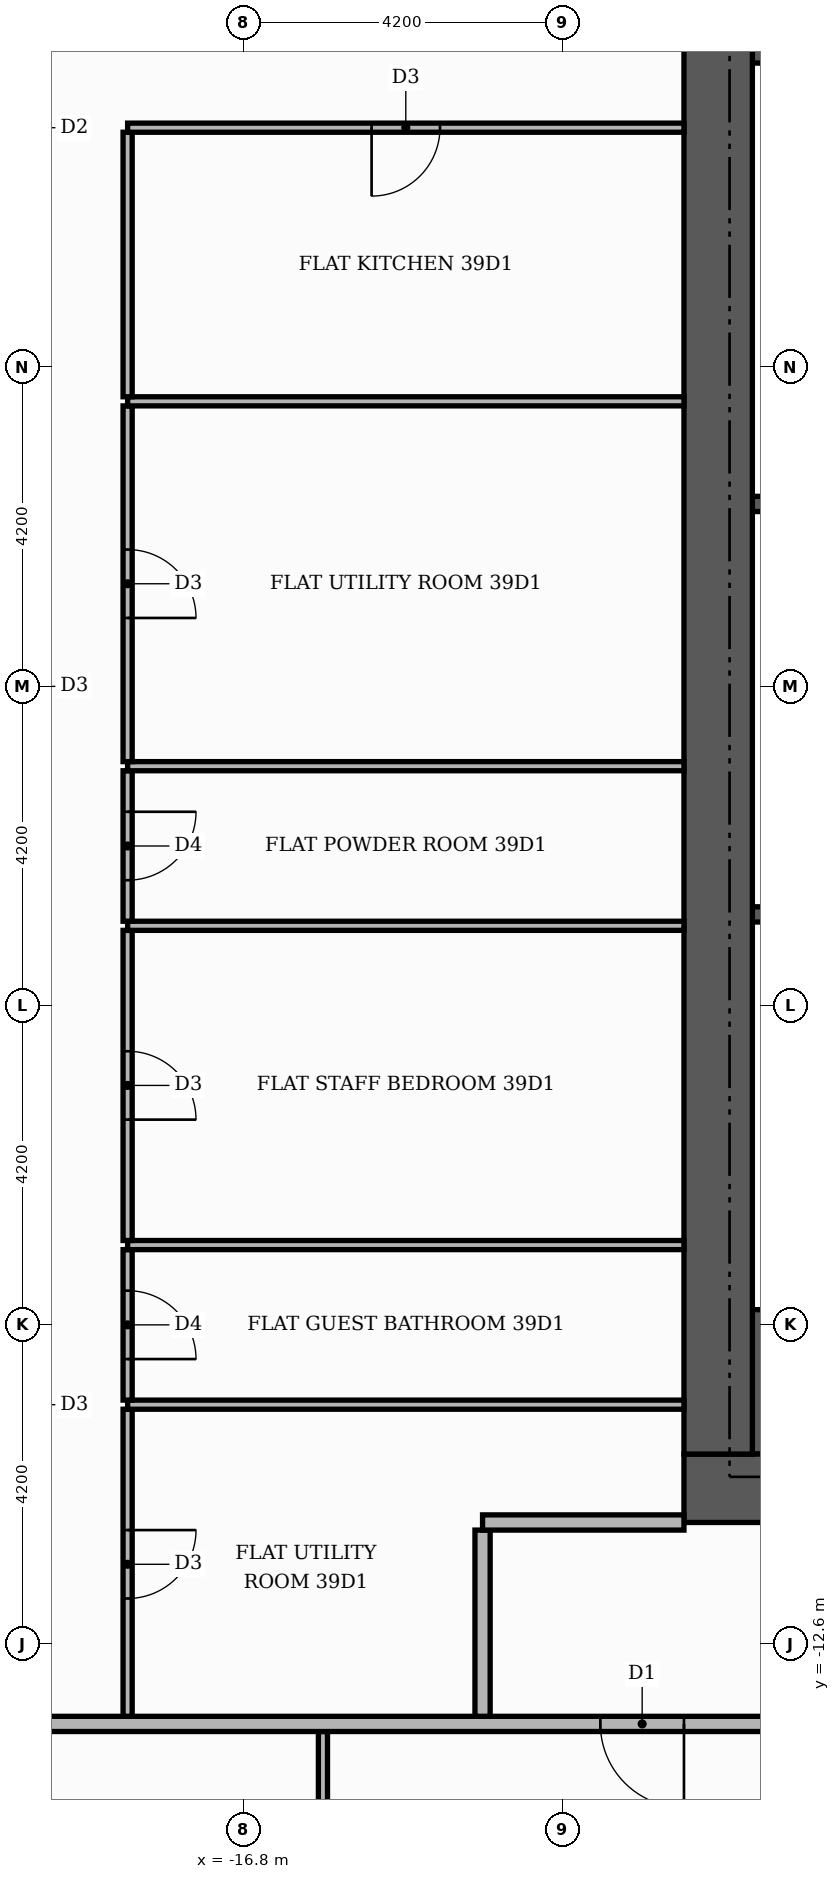
"""IFC4 building model, lengths in metres.
Left out: names, types, materials, properties, quantities, classifications, styles, units other than length and angle.
Written with IfcOpenShell. Run it as: python <this file> out.ifc"""

import sys

from ifc_helpers import new_model, si_unit, direction, frame, frame_2d, origin, place, context, subcontext, project, spatial, rectangle, extrude, element, fill, save


model = new_model("IFC4")
c1 = context("Model", 3, precision=1e-05, world=origin(), true_north=direction((0.0, 1.0)))
c2 = subcontext(c1, "Body", "Model", "MODEL_VIEW")
j1 = project(units=[si_unit("LENGTHUNIT", "METRE"), si_unit("PLANEANGLEUNIT", "RADIAN")], contexts=[c1])
p1 = place(None, origin())
s1 = spatial("IfcSite", under=j1, at=p1, CompositionType="ELEMENT")
p2 = place(p1, origin())
s2 = spatial("IfcBuilding", under=s1, at=p2, CompositionType="ELEMENT")
p3 = place(p2, frame((0.0, 0.0, 165.0)))
s3 = spatial("IfcBuildingStorey", under=s2, at=p3, CompositionType="ELEMENT", Elevation=165.0)
for number, where, z_axis, x_axis in (
    (1, (-10.1, -9.15, 0.0), (0.0, 0.0, 1.0), (1.0, 0.0, 0.0)),
    (2, (-10.1, 9.15, 0.0), (0.0, 0.0, 1.0), (1.0, 0.0, 0.0)),
):
    element("IfcWall", number, at=place(p3, frame(where, z_axis=z_axis, x_axis=x_axis)), inside=s3, PredefinedType="SHEAR", context=c2, shape_type="SweptSolid", body=[
        extrude(rectangle(XDim=4.6, YDim=1.9, at=frame_2d((2.3, 0.0))), origin(), (0.0, 0.0, 1.0), 3.48),
    ])
for number, where, z_axis, x_axis in (
    (3, (-10.1, -3.0, 0.0), (0.0, 0.0, 1.0), (1.0, 0.0, 0.0)),
    (4, (-10.1, 2.4, 0.0), (0.0, 0.0, 1.0), (1.0, 0.0, 0.0)),
):
    element("IfcWall", number, at=place(p3, frame(where, z_axis=z_axis, x_axis=x_axis)), inside=s3, PredefinedType="SHEAR", context=c2, shape_type="SweptSolid", body=[
        extrude(rectangle(XDim=0.9, YDim=0.2, at=frame_2d((0.45, 0.0))), origin(), (0.0, 0.0, 1.0), 3.48),
    ])
p4 = place(p3, frame((-11.0, -10.55, 0.0), z_axis=(0.0, 0.0, 1.0), x_axis=(1.0, 0.0, 0.0)))
e5 = element("IfcWall", 5, at=p4, inside=s3, PredefinedType="SHEAR", context=c2, shape_type="SweptSolid", body=[
    extrude(rectangle(XDim=22.0, YDim=0.9, at=frame_2d((11.0, 0.0))), origin(), (0.0, 0.0, 1.0), 3.48),
])
p5 = place(p4, frame((7.4, 0.0, 0.0)))
e6 = element("IfcOpeningElement", 6, at=p5, cuts=e5, PredefinedType="OPENING", context=c2, shape_type="SweptSolid", body=[
    extrude(rectangle(XDim=1.8, YDim=2.2, at=frame_2d((0.9, 1.1))), frame((0.0, 0.46, 0.0), z_axis=(0.0, -1.0, 0.0), x_axis=(1.0, 0.0, 0.0)), (0.0, 0.0, 1.0), 0.92),
])
p6 = place(p3, frame((-10.55, -10.1, 0.0), z_axis=(0.0, 0.0, 1.0), x_axis=(0.0, 1.0, 0.0)))
e7 = element("IfcWall", 7, at=p6, inside=s3, PredefinedType="SHEAR", context=c2, shape_type="SweptSolid", body=[
    extrude(rectangle(XDim=20.2, YDim=0.9, at=frame_2d((10.1, 0.0))), origin(), (0.0, 0.0, 1.0), 3.48),
])
p7 = place(p3, frame((-15.75, -20.06, 0.0), z_axis=(0.0, 0.0, 1.0), x_axis=(0.0, 1.0, 0.0)))
e8 = element("IfcWall", 8, at=p7, inside=s3, PredefinedType="PARTITIONING", context=c2, shape_type="SweptSolid", body=[
    extrude(rectangle(XDim=6.31, YDim=0.12, at=frame_2d((3.155, 0.0))), origin(), (0.0, 0.0, 1.0), 3.48),
])
p8 = place(p7, frame((2.675, 0.0, 0.0)))
e9 = element("IfcOpeningElement", 9, at=p8, cuts=e8, PredefinedType="OPENING", context=c2, shape_type="SweptSolid", body=[
    extrude(rectangle(XDim=1.0, YDim=2.1, at=frame_2d((0.5, 1.05))), frame((0.0, 0.07, 0.0), z_axis=(0.0, -1.0, 0.0), x_axis=(1.0, 0.0, 0.0)), (0.0, 0.0, 1.0), 0.14),
])
p9 = place(p3, frame((-25.42, -13.65, 0.0), z_axis=(0.0, 0.0, 1.0), x_axis=(1.0, 0.0, 0.0)))
e10 = element("IfcWall", 10, at=p9, inside=s3, PredefinedType="PARTITIONING", context=c2, shape_type="SweptSolid", body=[
    extrude(rectangle(XDim=39.07, YDim=0.2, at=frame_2d((19.535, 0.0))), origin(), (0.0, 0.0, 1.0), 3.48),
])
p10 = place(p9, frame((13.32, 0.0, 0.0)))
e11 = element("IfcOpeningElement", 11, at=p10, cuts=e10, PredefinedType="OPENING", context=c2, shape_type="SweptSolid", body=[
    extrude(rectangle(XDim=1.1, YDim=2.4, at=frame_2d((0.55, 1.2))), frame((0.0, 0.11, 0.0), z_axis=(0.0, -1.0, 0.0), x_axis=(1.0, 0.0, 0.0)), (0.0, 0.0, 1.0), 0.22),
])
p11 = place(p9, frame((21.72, 0.0, 0.0)))
e12 = element("IfcOpeningElement", 12, at=p11, cuts=e10, PredefinedType="OPENING", context=c2, shape_type="SweptSolid", body=[
    extrude(rectangle(XDim=1.1, YDim=2.4, at=frame_2d((0.55, 1.2))), frame((0.0, 0.11, 0.0), z_axis=(0.0, -1.0, 0.0), x_axis=(1.0, 0.0, 0.0)), (0.0, 0.0, 1.0), 0.22),
])
p12 = place(p3, frame((-18.32, -13.55, 0.0), z_axis=(0.0, 0.0, 1.0), x_axis=(0.0, 1.0, 0.0)))
e13 = element("IfcWall", 13, at=p12, inside=s3, PredefinedType="PARTITIONING", context=c2, shape_type="SweptSolid", body=[
    extrude(rectangle(XDim=4.04, YDim=0.12, at=frame_2d((2.02, 0.0))), origin(), (0.0, 0.0, 1.0), 3.48),
])
p13 = place(p12, frame((1.55, 0.0, 0.0)))
e14 = element("IfcOpeningElement", 14, at=p13, cuts=e13, PredefinedType="OPENING", context=c2, shape_type="SweptSolid", body=[
    extrude(rectangle(XDim=0.9, YDim=2.1, at=frame_2d((0.45, 1.05))), frame((0.0, 0.07, 0.0), z_axis=(0.0, -1.0, 0.0), x_axis=(1.0, 0.0, 0.0)), (0.0, 0.0, 1.0), 0.14),
])
p14 = place(p3, frame((-13.65, -13.55, 0.0), z_axis=(0.0, 0.0, 1.0), x_axis=(0.0, 1.0, 0.0)))
e15 = element("IfcWall", 15, at=p14, inside=s3, PredefinedType="PARTITIONING", context=c2, shape_type="SweptSolid", body=[
    extrude(rectangle(XDim=2.45, YDim=0.2, at=frame_2d((1.225, 0.0))), origin(), (0.0, 0.0, 1.0), 3.48),
])
p15 = place(p3, frame((-13.65, -11.0, 0.0), z_axis=(0.0, 0.0, 1.0), x_axis=(1.0, 0.0, 0.0)))
e16 = element("IfcWall", 16, at=p15, inside=s3, PredefinedType="PARTITIONING", context=c2, shape_type="SweptSolid", body=[
    extrude(rectangle(XDim=2.65, YDim=0.2, at=frame_2d((1.325, 0.0))), origin(), (0.0, 0.0, 1.0), 3.48),
])
p16 = place(p3, frame((-18.32, -9.45, 0.0), z_axis=(0.0, 0.0, 1.0), x_axis=(1.0, 0.0, 0.0)))
e17 = element("IfcWall", 17, at=p16, inside=s3, PredefinedType="PARTITIONING", context=c2, shape_type="SweptSolid", body=[
    extrude(rectangle(XDim=7.32, YDim=0.12, at=frame_2d((3.66, 0.0))), origin(), (0.0, 0.0, 1.0), 3.48),
])
p17 = place(p3, frame((-18.32, -9.39, 0.0), z_axis=(0.0, 0.0, 1.0), x_axis=(0.0, 1.0, 0.0)))
e18 = element("IfcWall", 18, at=p17, inside=s3, PredefinedType="PARTITIONING", context=c2, shape_type="SweptSolid", body=[
    extrude(rectangle(XDim=1.98, YDim=0.12, at=frame_2d((0.99, 0.0))), origin(), (0.0, 0.0, 1.0), 3.48),
])
p18 = place(p17, frame((0.54, 0.0, 0.0)))
e19 = element("IfcOpeningElement", 19, at=p18, cuts=e18, PredefinedType="OPENING", context=c2, shape_type="SweptSolid", body=[
    extrude(rectangle(XDim=0.9, YDim=2.1, at=frame_2d((0.45, 1.05))), frame((0.0, 0.07, 0.0), z_axis=(0.0, -1.0, 0.0), x_axis=(1.0, 0.0, 0.0)), (0.0, 0.0, 1.0), 0.14),
])
p19 = place(p3, frame((-18.32, -7.35, 0.0), z_axis=(0.0, 0.0, 1.0), x_axis=(1.0, 0.0, 0.0)))
e20 = element("IfcWall", 20, at=p19, inside=s3, PredefinedType="PARTITIONING", context=c2, shape_type="SweptSolid", body=[
    extrude(rectangle(XDim=7.32, YDim=0.12, at=frame_2d((3.66, 0.0))), origin(), (0.0, 0.0, 1.0), 3.48),
])
p20 = place(p3, frame((-18.32, -7.29, 0.0), z_axis=(0.0, 0.0, 1.0), x_axis=(0.0, 1.0, 0.0)))
e21 = element("IfcWall", 21, at=p20, inside=s3, PredefinedType="PARTITIONING", context=c2, shape_type="SweptSolid", body=[
    extrude(rectangle(XDim=4.08, YDim=0.12, at=frame_2d((2.04, 0.0))), origin(), (0.0, 0.0, 1.0), 3.48),
])
p21 = place(p20, frame((1.59, 0.0, 0.0)))
e22 = element("IfcOpeningElement", 22, at=p21, cuts=e21, PredefinedType="OPENING", context=c2, shape_type="SweptSolid", body=[
    extrude(rectangle(XDim=0.9, YDim=2.1, at=frame_2d((0.45, 1.05))), frame((0.0, 0.07, 0.0), z_axis=(0.0, -1.0, 0.0), x_axis=(1.0, 0.0, 0.0)), (0.0, 0.0, 1.0), 0.14),
])
p22 = place(p3, frame((-18.32, -3.15, 0.0), z_axis=(0.0, 0.0, 1.0), x_axis=(1.0, 0.0, 0.0)))
e23 = element("IfcWall", 23, at=p22, inside=s3, PredefinedType="PARTITIONING", context=c2, shape_type="SweptSolid", body=[
    extrude(rectangle(XDim=7.32, YDim=0.12, at=frame_2d((3.66, 0.0))), origin(), (0.0, 0.0, 1.0), 3.48),
])
p23 = place(p3, frame((-18.32, -3.09, 0.0), z_axis=(0.0, 0.0, 1.0), x_axis=(0.0, 1.0, 0.0)))
e24 = element("IfcWall", 24, at=p23, inside=s3, PredefinedType="PARTITIONING", context=c2, shape_type="SweptSolid", body=[
    extrude(rectangle(XDim=1.98, YDim=0.12, at=frame_2d((0.99, 0.0))), origin(), (0.0, 0.0, 1.0), 3.48),
])
p24 = place(p23, frame((0.54, 0.0, 0.0)))
e25 = element("IfcOpeningElement", 25, at=p24, cuts=e24, PredefinedType="OPENING", context=c2, shape_type="SweptSolid", body=[
    extrude(rectangle(XDim=0.9, YDim=2.1, at=frame_2d((0.45, 1.05))), frame((0.0, 0.07, 0.0), z_axis=(0.0, -1.0, 0.0), x_axis=(1.0, 0.0, 0.0)), (0.0, 0.0, 1.0), 0.14),
])
p25 = place(p3, frame((-18.32, -1.05, 0.0), z_axis=(0.0, 0.0, 1.0), x_axis=(1.0, 0.0, 0.0)))
e26 = element("IfcWall", 26, at=p25, inside=s3, PredefinedType="PARTITIONING", context=c2, shape_type="SweptSolid", body=[
    extrude(rectangle(XDim=7.32, YDim=0.12, at=frame_2d((3.66, 0.0))), origin(), (0.0, 0.0, 1.0), 3.48),
])
p26 = place(p3, frame((-18.32, -0.99, 0.0), z_axis=(0.0, 0.0, 1.0), x_axis=(0.0, 1.0, 0.0)))
e27 = element("IfcWall", 27, at=p26, inside=s3, PredefinedType="PARTITIONING", context=c2, shape_type="SweptSolid", body=[
    extrude(rectangle(XDim=4.68, YDim=0.12, at=frame_2d((2.34, 0.0))), origin(), (0.0, 0.0, 1.0), 3.48),
])
p27 = place(p26, frame((1.89, 0.0, 0.0)))
e28 = element("IfcOpeningElement", 28, at=p27, cuts=e27, PredefinedType="OPENING", context=c2, shape_type="SweptSolid", body=[
    extrude(rectangle(XDim=0.9, YDim=2.1, at=frame_2d((0.45, 1.05))), frame((0.0, 0.07, 0.0), z_axis=(0.0, -1.0, 0.0), x_axis=(1.0, 0.0, 0.0)), (0.0, 0.0, 1.0), 0.14),
])
p28 = place(p3, frame((-18.32, 3.75, 0.0), z_axis=(0.0, 0.0, 1.0), x_axis=(1.0, 0.0, 0.0)))
e29 = element("IfcWall", 29, at=p28, inside=s3, PredefinedType="PARTITIONING", context=c2, shape_type="SweptSolid", body=[
    extrude(rectangle(XDim=7.32, YDim=0.12, at=frame_2d((3.66, 0.0))), origin(), (0.0, 0.0, 1.0), 3.48),
])
p29 = place(p3, frame((-18.32, 3.81, 0.0), z_axis=(0.0, 0.0, 1.0), x_axis=(0.0, 1.0, 0.0)))
e30 = element("IfcWall", 30, at=p29, inside=s3, PredefinedType="PARTITIONING", context=c2, shape_type="SweptSolid", body=[
    extrude(rectangle(XDim=3.48, YDim=0.12, at=frame_2d((1.74, 0.0))), origin(), (0.0, 0.0, 1.0), 3.48),
])
p30 = place(p3, frame((-18.32, 7.35, 0.0), z_axis=(0.0, 0.0, 1.0), x_axis=(1.0, 0.0, 0.0)))
e31 = element("IfcWall", 31, at=p30, inside=s3, PredefinedType="PARTITIONING", context=c2, shape_type="SweptSolid", body=[
    extrude(rectangle(XDim=7.32, YDim=0.12, at=frame_2d((3.66, 0.0))), origin(), (0.0, 0.0, 1.0), 3.48),
])
p31 = place(p30, frame((3.21, 0.0, 0.0)))
e32 = element("IfcOpeningElement", 32, at=p31, cuts=e31, PredefinedType="OPENING", context=c2, shape_type="SweptSolid", body=[
    extrude(rectangle(XDim=0.9, YDim=2.1, at=frame_2d((0.45, 1.05))), frame((0.0, 0.07, 0.0), z_axis=(0.0, -1.0, 0.0), x_axis=(1.0, 0.0, 0.0)), (0.0, 0.0, 1.0), 0.14),
])
p32 = place(p10, frame((1.1, 0.0, 0.0), z_axis=(0.0, 0.0, 1.0), x_axis=(-1.0, 0.0, 0.0)))
e33 = element("IfcDoor", 33, at=p32, inside=s3, OperationType="SINGLE_SWING_RIGHT", PredefinedType="DOOR", context=c2, shape_type="SweptSolid", body=[
    extrude(rectangle(XDim=1.1, YDim=2.4, at=frame_2d((0.55, 1.2))), frame((0.0, 0.025, 0.0), z_axis=(0.0, -1.0, 0.0), x_axis=(1.0, 0.0, 0.0)), (0.0, 0.0, 1.0), 0.05),
])
fill(e11, e33)
p33 = place(p31, frame((0.9, 0.0, 0.0), z_axis=(0.0, 0.0, 1.0), x_axis=(-1.0, 0.0, 0.0)))
e34 = element("IfcDoor", 34, at=p33, inside=s3, OperationType="SINGLE_SWING_LEFT", PredefinedType="DOOR", context=c2, shape_type="SweptSolid", body=[
    extrude(rectangle(XDim=0.9, YDim=2.1, at=frame_2d((0.45, 1.05))), frame((0.0, 0.025, 0.0), z_axis=(0.0, -1.0, 0.0), x_axis=(1.0, 0.0, 0.0)), (0.0, 0.0, 1.0), 0.05),
])
fill(e32, e34)
p34 = place(p27, frame((0.9, 0.0, 0.0), z_axis=(0.0, 0.0, 1.0), x_axis=(-1.0, 0.0, 0.0)))
e35 = element("IfcDoor", 35, at=p34, inside=s3, OperationType="SINGLE_SWING_LEFT", PredefinedType="DOOR", context=c2, shape_type="SweptSolid", body=[
    extrude(rectangle(XDim=0.9, YDim=2.1, at=frame_2d((0.45, 1.05))), frame((0.0, 0.025, 0.0), z_axis=(0.0, -1.0, 0.0), x_axis=(1.0, 0.0, 0.0)), (0.0, 0.0, 1.0), 0.05),
])
fill(e28, e35)
p35 = place(p24, frame((0.9, 0.0, 0.0), z_axis=(0.0, 0.0, 1.0), x_axis=(-1.0, 0.0, 0.0)))
e36 = element("IfcDoor", 36, at=p35, inside=s3, OperationType="SINGLE_SWING_RIGHT", PredefinedType="DOOR", context=c2, shape_type="SweptSolid", body=[
    extrude(rectangle(XDim=0.9, YDim=2.1, at=frame_2d((0.45, 1.05))), frame((0.0, 0.025, 0.0), z_axis=(0.0, -1.0, 0.0), x_axis=(1.0, 0.0, 0.0)), (0.0, 0.0, 1.0), 0.05),
])
fill(e25, e36)
p36 = place(p21, frame((0.9, 0.0, 0.0), z_axis=(0.0, 0.0, 1.0), x_axis=(-1.0, 0.0, 0.0)))
e37 = element("IfcDoor", 37, at=p36, inside=s3, OperationType="SINGLE_SWING_LEFT", PredefinedType="DOOR", context=c2, shape_type="SweptSolid", body=[
    extrude(rectangle(XDim=0.9, YDim=2.1, at=frame_2d((0.45, 1.05))), frame((0.0, 0.025, 0.0), z_axis=(0.0, -1.0, 0.0), x_axis=(1.0, 0.0, 0.0)), (0.0, 0.0, 1.0), 0.05),
])
fill(e22, e37)
p37 = place(p18, frame((0.9, 0.0, 0.0), z_axis=(0.0, 0.0, 1.0), x_axis=(-1.0, 0.0, 0.0)))
e38 = element("IfcDoor", 38, at=p37, inside=s3, OperationType="SINGLE_SWING_LEFT", PredefinedType="DOOR", context=c2, shape_type="SweptSolid", body=[
    extrude(rectangle(XDim=0.9, YDim=2.1, at=frame_2d((0.45, 1.05))), frame((0.0, 0.025, 0.0), z_axis=(0.0, -1.0, 0.0), x_axis=(1.0, 0.0, 0.0)), (0.0, 0.0, 1.0), 0.05),
])
fill(e19, e38)
p38 = place(p13, frame((0.9, 0.0, 0.0), z_axis=(0.0, 0.0, 1.0), x_axis=(-1.0, 0.0, 0.0)))
e39 = element("IfcDoor", 39, at=p38, inside=s3, OperationType="SINGLE_SWING_RIGHT", PredefinedType="DOOR", context=c2, shape_type="SweptSolid", body=[
    extrude(rectangle(XDim=0.9, YDim=2.1, at=frame_2d((0.45, 1.05))), frame((0.0, 0.025, 0.0), z_axis=(0.0, -1.0, 0.0), x_axis=(1.0, 0.0, 0.0)), (0.0, 0.0, 1.0), 0.05),
])
fill(e14, e39)
save(model, sys.argv[1])
